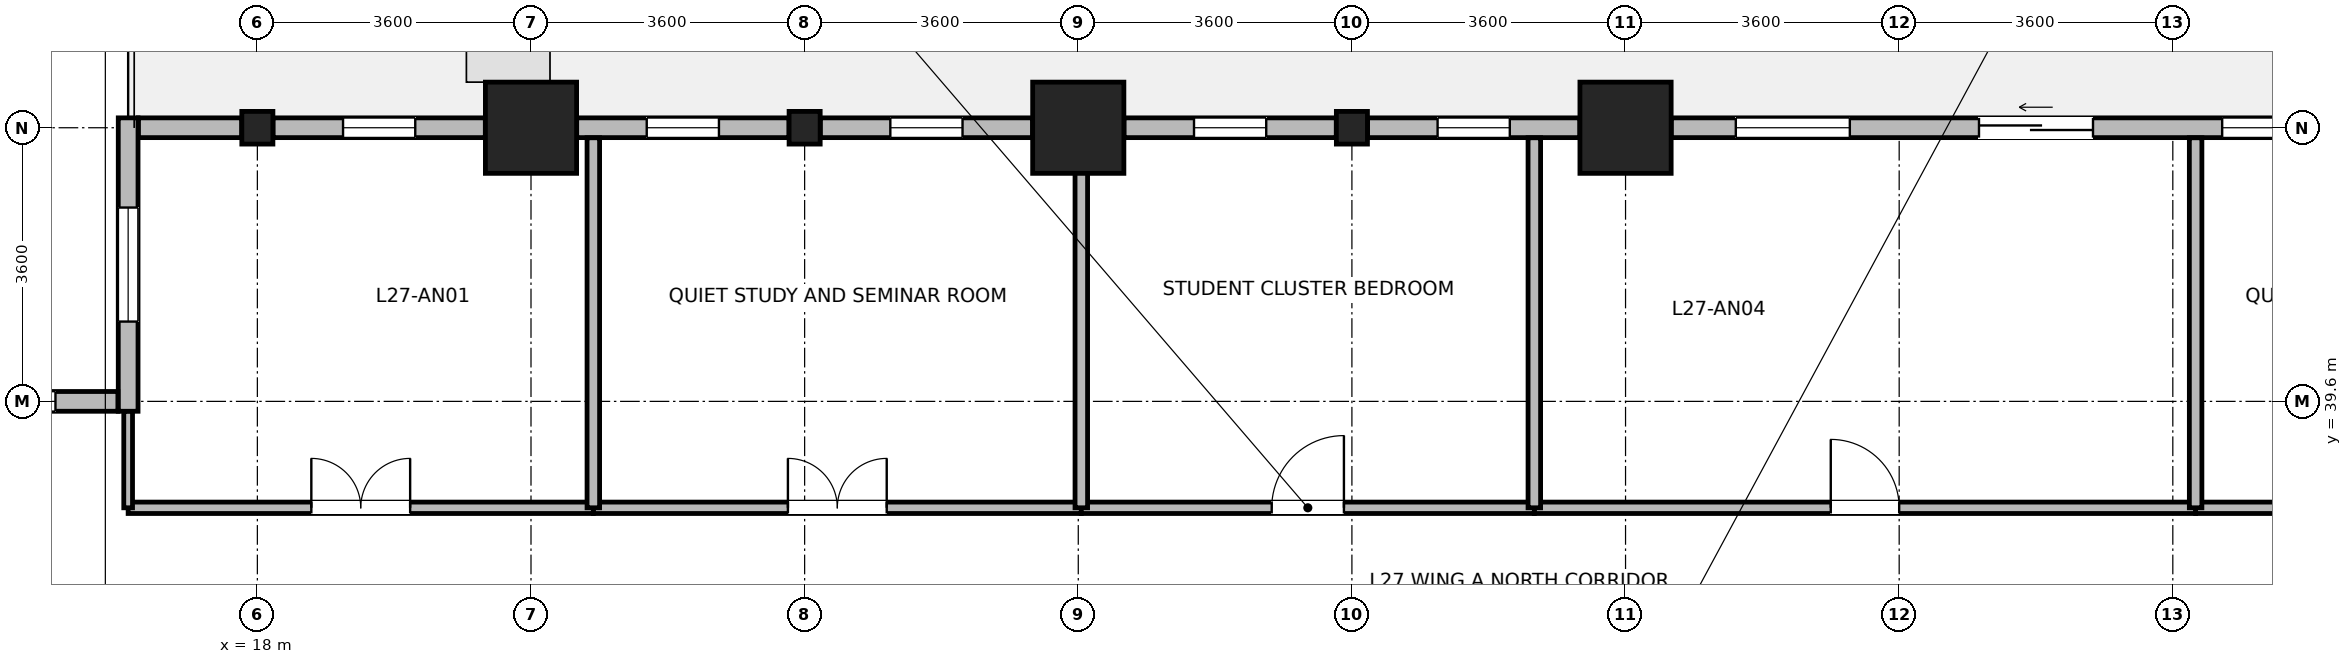
"""IFC4 building model, lengths in metres.
Left out: names, types, materials, properties, quantities, classifications, styles, units other than length and angle.
Written with IfcOpenShell. Run it as: python <this file> out.ifc"""

import sys

from ifc_helpers import new_model, si_unit, direction, frame, frame_2d, origin, origin_2d, place, context, subcontext, project, spatial, rectangle, i_section, extrude, source, transform, mapped, element, fill, save


model = new_model("IFC4")
c1 = context("Model", 3, precision=1e-05, world=origin(), true_north=direction((0.0, 1.0)))
c2 = subcontext(c1, "Body", "Model", "MODEL_VIEW")
j1 = project(units=[si_unit("LENGTHUNIT", "METRE"), si_unit("PLANEANGLEUNIT", "RADIAN")], contexts=[c1])
p1 = place(None, origin())
s1 = spatial("IfcSite", under=j1, at=p1, CompositionType="ELEMENT")
p2 = place(p1, origin())
s2 = spatial("IfcBuilding", under=s1, at=p2, CompositionType="ELEMENT")
p3 = place(p2, frame((0.0, 0.0, 108.2)))
s3 = spatial("IfcBuildingStorey", under=s2, at=p3, CompositionType="ELEMENT", Elevation=108.2)
m1 = source(origin(), c2, "Body", "SweptSolid", [
    extrude(rectangle(XDim=1.2, YDim=1.2, at=origin_2d()), origin(), (0.0, 0.0, 1.0), 3.7),
])
for number, where, z_axis, x_axis in (
    (1, (21.6, 43.2, 0.0), (0.0, 0.0, 1.0), (1.0, 0.0, 0.0)),
    (2, (28.8, 43.2, 0.0), (0.0, 0.0, 1.0), (1.0, 0.0, 0.0)),
    (3, (36.0, 43.2, 0.0), (0.0, 0.0, 1.0), (1.0, 0.0, 0.0)),
):
    element("IfcColumn", number, at=place(p3, frame(where, z_axis=z_axis, x_axis=x_axis)), inside=s3, PredefinedType="COLUMN", context=c2, shape_type="MappedRepresentation", body=[
        mapped(m1, transform((0.0, 0.0, 0.0), x_axis=(1.0, 0.0, 0.0), y_axis=(0.0, 1.0, 0.0), z_axis=(0.0, 0.0, 1.0), scale=1.0)),
    ])
m2 = source(origin(), c2, "Body", "SweptSolid", [
    extrude(i_section(OverallWidth=0.409, OverallDepth=0.43, WebThickness=0.024, FlangeThickness=0.033, FilletRadius=0.015, at=origin_2d()), origin(), (0.0, 0.0, 1.0), 3.7),
])
for number, where, z_axis, x_axis in (
    (4, (18.0, 43.2, 0.0), (0.0, 0.0, 1.0), (1.0, 0.0, 0.0)),
    (5, (25.2, 43.2, 0.0), (0.0, 0.0, 1.0), (1.0, 0.0, 0.0)),
    (6, (32.4, 43.2, 0.0), (0.0, 0.0, 1.0), (1.0, 0.0, 0.0)),
):
    element("IfcColumn", number, at=place(p3, frame(where, z_axis=z_axis, x_axis=x_axis)), inside=s3, PredefinedType="COLUMN", context=c2, shape_type="MappedRepresentation", body=[
        mapped(m2, transform((0.0, 0.0, 0.0), x_axis=(1.0, 0.0, 0.0), y_axis=(0.0, 1.0, 0.0), z_axis=(0.0, 0.0, 1.0), scale=1.0)),
    ])
p4 = place(p3, frame((36.601, 43.2, 0.0), z_axis=(0.0, 0.0, 1.0), x_axis=(1.0, 0.0, 0.0)))
e7 = element("IfcWall", 7, at=p4, inside=s3, PredefinedType="STANDARD", context=c2, shape_type="SweptSolid", body=[
    extrude(rectangle(XDim=9.598, YDim=0.26, at=frame_2d((4.799, 0.0))), origin(), (0.0, 0.0, 1.0), 2.98),
])
p5 = place(p4, frame((4.049, 0.0, 0.0)))
e8 = element("IfcOpeningElement", 8, at=p5, cuts=e7, PredefinedType="OPENING", context=c2, shape_type="SweptSolid", body=[
    extrude(rectangle(XDim=1.5, YDim=2.15, at=frame_2d((0.75, 1.075))), frame((0.0, 0.14, 0.0), z_axis=(0.0, -1.0, 0.0), x_axis=(1.0, 0.0, 0.0)), (0.0, 0.0, 1.0), 0.28),
])
p6 = place(p4, frame((0.85, 0.0, 0.85)))
e9 = element("IfcOpeningElement", 9, at=p6, cuts=e7, PredefinedType="OPENING", context=c2, shape_type="SweptSolid", body=[
    extrude(rectangle(XDim=1.5, YDim=1.85, at=frame_2d((0.75, 0.925))), frame((0.0, 0.14, 0.0), z_axis=(0.0, -1.0, 0.0), x_axis=(1.0, 0.0, 0.0)), (0.0, 0.0, 1.0), 0.28),
])
p7 = place(p4, frame((7.248, 0.0, 0.85)))
e10 = element("IfcOpeningElement", 10, at=p7, cuts=e7, PredefinedType="OPENING", context=c2, shape_type="SweptSolid", body=[
    extrude(rectangle(XDim=1.5, YDim=1.85, at=frame_2d((0.75, 0.925))), frame((0.0, 0.14, 0.0), z_axis=(0.0, -1.0, 0.0), x_axis=(1.0, 0.0, 0.0)), (0.0, 0.0, 1.0), 0.28),
])
p8 = place(p3, frame((32.605, 43.2, 0.0), z_axis=(0.0, 0.0, 1.0), x_axis=(1.0, 0.0, 0.0)))
e11 = element("IfcWall", 11, at=p8, inside=s3, PredefinedType="STANDARD", context=c2, shape_type="SweptSolid", body=[
    extrude(rectangle(XDim=2.793, YDim=0.26, at=frame_2d((1.397, 0.0))), origin(), (0.0, 0.0, 1.0), 2.98),
])
p9 = place(p8, frame((0.922, 0.0, 0.85)))
e12 = element("IfcOpeningElement", 12, at=p9, cuts=e11, PredefinedType="OPENING", context=c2, shape_type="SweptSolid", body=[
    extrude(rectangle(XDim=0.95, YDim=1.75, at=frame_2d((0.475, 0.875))), frame((0.0, 0.14, 0.0), z_axis=(0.0, -1.0, 0.0), x_axis=(1.0, 0.0, 0.0)), (0.0, 0.0, 1.0), 0.28),
])
p10 = place(p3, frame((29.401, 43.2, 0.0), z_axis=(0.0, 0.0, 1.0), x_axis=(1.0, 0.0, 0.0)))
e13 = element("IfcWall", 13, at=p10, inside=s3, PredefinedType="STANDARD", context=c2, shape_type="SweptSolid", body=[
    extrude(rectangle(XDim=2.794, YDim=0.26, at=frame_2d((1.397, 0.0))), origin(), (0.0, 0.0, 1.0), 2.98),
])
p11 = place(p10, frame((0.922, 0.0, 0.85)))
e14 = element("IfcOpeningElement", 14, at=p11, cuts=e13, PredefinedType="OPENING", context=c2, shape_type="SweptSolid", body=[
    extrude(rectangle(XDim=0.95, YDim=1.75, at=frame_2d((0.475, 0.875))), frame((0.0, 0.14, 0.0), z_axis=(0.0, -1.0, 0.0), x_axis=(1.0, 0.0, 0.0)), (0.0, 0.0, 1.0), 0.28),
])
p12 = place(p3, frame((25.406, 43.2, 0.0), z_axis=(0.0, 0.0, 1.0), x_axis=(1.0, 0.0, 0.0)))
e15 = element("IfcWall", 15, at=p12, inside=s3, PredefinedType="STANDARD", context=c2, shape_type="SweptSolid", body=[
    extrude(rectangle(XDim=2.793, YDim=0.26, at=frame_2d((1.397, 0.0))), origin(), (0.0, 0.0, 1.0), 2.98),
])
p13 = place(p12, frame((0.922, 0.0, 0.85)))
e16 = element("IfcOpeningElement", 16, at=p13, cuts=e15, PredefinedType="OPENING", context=c2, shape_type="SweptSolid", body=[
    extrude(rectangle(XDim=0.95, YDim=1.75, at=frame_2d((0.475, 0.875))), frame((0.0, 0.14, 0.0), z_axis=(0.0, -1.0, 0.0), x_axis=(1.0, 0.0, 0.0)), (0.0, 0.0, 1.0), 0.28),
])
p14 = place(p3, frame((22.201, 43.2, 0.0), z_axis=(0.0, 0.0, 1.0), x_axis=(1.0, 0.0, 0.0)))
e17 = element("IfcWall", 17, at=p14, inside=s3, PredefinedType="STANDARD", context=c2, shape_type="SweptSolid", body=[
    extrude(rectangle(XDim=2.793, YDim=0.26, at=frame_2d((1.397, 0.0))), origin(), (0.0, 0.0, 1.0), 2.98),
])
p15 = place(p14, frame((0.922, 0.0, 0.85)))
e18 = element("IfcOpeningElement", 18, at=p15, cuts=e17, PredefinedType="OPENING", context=c2, shape_type="SweptSolid", body=[
    extrude(rectangle(XDim=0.95, YDim=1.75, at=frame_2d((0.475, 0.875))), frame((0.0, 0.14, 0.0), z_axis=(0.0, -1.0, 0.0), x_axis=(1.0, 0.0, 0.0)), (0.0, 0.0, 1.0), 0.28),
])
p16 = place(p3, frame((18.206, 43.2, 0.0), z_axis=(0.0, 0.0, 1.0), x_axis=(1.0, 0.0, 0.0)))
e19 = element("IfcWall", 19, at=p16, inside=s3, PredefinedType="STANDARD", context=c2, shape_type="SweptSolid", body=[
    extrude(rectangle(XDim=2.793, YDim=0.26, at=frame_2d((1.397, 0.0))), origin(), (0.0, 0.0, 1.0), 2.98),
])
p17 = place(p16, frame((0.922, 0.0, 0.85)))
e20 = element("IfcOpeningElement", 20, at=p17, cuts=e19, PredefinedType="OPENING", context=c2, shape_type="SweptSolid", body=[
    extrude(rectangle(XDim=0.95, YDim=1.75, at=frame_2d((0.475, 0.875))), frame((0.0, 0.14, 0.0), z_axis=(0.0, -1.0, 0.0), x_axis=(1.0, 0.0, 0.0)), (0.0, 0.0, 1.0), 0.28),
])
p18 = place(p3, frame((16.435, 43.2, 0.0), z_axis=(0.0, 0.0, 1.0), x_axis=(1.0, 0.0, 0.0)))
e21 = element("IfcWall", 21, at=p18, inside=s3, PredefinedType="STANDARD", context=c2, shape_type="SweptSolid", body=[
    extrude(rectangle(XDim=1.359, YDim=0.26, at=frame_2d((0.68, 0.0))), origin(), (0.0, 0.0, 1.0), 2.98),
])
p19 = place(p3, frame((16.3, 39.47, 0.0), z_axis=(0.0, 0.0, 1.0), x_axis=(0.0, 1.0, 0.0)))
e22 = element("IfcWall", 22, at=p19, inside=s3, PredefinedType="STANDARD", context=c2, shape_type="SweptSolid", body=[
    extrude(rectangle(XDim=3.86, YDim=0.26, at=frame_2d((1.93, 0.0))), origin(), (0.0, 0.0, 1.0), 3.43),
])
p20 = place(p19, frame((1.18, 0.0, 0.85)))
e23 = element("IfcOpeningElement", 23, at=p20, cuts=e22, PredefinedType="OPENING", context=c2, shape_type="SweptSolid", body=[
    extrude(rectangle(XDim=1.5, YDim=1.85, at=frame_2d((0.75, 0.925))), frame((0.0, 0.14, 0.0), z_axis=(0.0, -1.0, 0.0), x_axis=(1.0, 0.0, 0.0)), (0.0, 0.0, 1.0), 0.28),
])
p21 = place(p3, frame((6.737, 39.6, 0.0), z_axis=(0.0, 0.0, 1.0), x_axis=(1.0, 0.0, 0.0)))
e24 = element("IfcWall", 24, at=p21, inside=s3, PredefinedType="STANDARD", context=c2, shape_type="SweptSolid", body=[
    extrude(rectangle(XDim=9.428, YDim=0.26, at=frame_2d((4.714, 0.0))), origin(), (0.0, 0.0, 1.0), 3.43),
])
p22 = place(p21, frame((0.821, 0.0, 0.85)))
e25 = element("IfcOpeningElement", 25, at=p22, cuts=e24, PredefinedType="OPENING", context=c2, shape_type="SweptSolid", body=[
    extrude(rectangle(XDim=1.5, YDim=1.85, at=frame_2d((0.75, 0.925))), frame((0.0, 0.14, 0.0), z_axis=(0.0, -1.0, 0.0), x_axis=(1.0, 0.0, 0.0)), (0.0, 0.0, 1.0), 0.28),
])
p23 = place(p21, frame((3.964, 0.0, 0.85)))
e26 = element("IfcOpeningElement", 26, at=p23, cuts=e24, PredefinedType="OPENING", context=c2, shape_type="SweptSolid", body=[
    extrude(rectangle(XDim=1.5, YDim=1.85, at=frame_2d((0.75, 0.925))), frame((0.0, 0.14, 0.0), z_axis=(0.0, -1.0, 0.0), x_axis=(1.0, 0.0, 0.0)), (0.0, 0.0, 1.0), 0.28),
])
p24 = place(p21, frame((7.107, 0.0, 0.85)))
e27 = element("IfcOpeningElement", 27, at=p24, cuts=e24, PredefinedType="OPENING", context=c2, shape_type="SweptSolid", body=[
    extrude(rectangle(XDim=1.5, YDim=1.85, at=frame_2d((0.75, 0.925))), frame((0.0, 0.14, 0.0), z_axis=(0.0, -1.0, 0.0), x_axis=(1.0, 0.0, 0.0)), (0.0, 0.0, 1.0), 0.28),
])
p25 = place(p3, frame((34.8, 38.2, 0.0), z_axis=(0.0, 0.0, 1.0), x_axis=(1.0, 0.0, 0.0)))
e28 = element("IfcWall", 28, at=p25, inside=s3, PredefinedType="PARTITIONING", context=c2, shape_type="SweptSolid", body=[
    extrude(rectangle(XDim=8.7, YDim=0.15, at=frame_2d((4.35, 0.0))), origin(), (0.0, 0.0, 1.0), 3.43),
])
p26 = place(p25, frame((3.9, 0.0, 0.0)))
e29 = element("IfcOpeningElement", 29, at=p26, cuts=e28, PredefinedType="OPENING", context=c2, shape_type="SweptSolid", body=[
    extrude(rectangle(XDim=0.9, YDim=2.08, at=frame_2d((0.45, 1.04))), frame((0.0, 0.085, 0.0), z_axis=(0.0, -1.0, 0.0), x_axis=(1.0, 0.0, 0.0)), (0.0, 0.0, 1.0), 0.17),
])
p27 = place(p3, frame((22.42, 38.2, 0.0), z_axis=(0.0, 0.0, 1.0), x_axis=(1.0, 0.0, 0.0)))
e30 = element("IfcWall", 30, at=p27, inside=s3, PredefinedType="PARTITIONING", context=c2, shape_type="SweptSolid", body=[
    extrude(rectangle(XDim=6.42, YDim=0.15, at=frame_2d((3.21, 0.0))), origin(), (0.0, 0.0, 1.0), 3.43),
])
p28 = place(p27, frame((2.56, 0.0, 0.0)))
e31 = element("IfcOpeningElement", 31, at=p28, cuts=e30, PredefinedType="OPENING", context=c2, shape_type="SweptSolid", body=[
    extrude(rectangle(XDim=1.3, YDim=2.12, at=frame_2d((0.65, 1.06))), frame((0.0, 0.085, 0.0), z_axis=(0.0, -1.0, 0.0), x_axis=(1.0, 0.0, 0.0)), (0.0, 0.0, 1.0), 0.17),
])
p29 = place(p3, frame((16.3, 38.2, 0.0), z_axis=(0.0, 0.0, 1.0), x_axis=(1.0, 0.0, 0.0)))
e32 = element("IfcWall", 32, at=p29, inside=s3, PredefinedType="PARTITIONING", context=c2, shape_type="SweptSolid", body=[
    extrude(rectangle(XDim=6.12, YDim=0.15, at=frame_2d((3.06, 0.0))), origin(), (0.0, 0.0, 1.0), 3.43),
])
p30 = place(p29, frame((2.41, 0.0, 0.0)))
e33 = element("IfcOpeningElement", 33, at=p30, cuts=e32, PredefinedType="OPENING", context=c2, shape_type="SweptSolid", body=[
    extrude(rectangle(XDim=1.3, YDim=2.12, at=frame_2d((0.65, 1.06))), frame((0.0, 0.085, 0.0), z_axis=(0.0, -1.0, 0.0), x_axis=(1.0, 0.0, 0.0)), (0.0, 0.0, 1.0), 0.17),
])
p31 = place(p3, frame((28.84, 38.2, 0.0), z_axis=(0.0, 0.0, 1.0), x_axis=(1.0, 0.0, 0.0)))
e34 = element("IfcWall", 34, at=p31, inside=s3, PredefinedType="PARTITIONING", context=c2, shape_type="SweptSolid", body=[
    extrude(rectangle(XDim=5.96, YDim=0.15, at=frame_2d((2.98, 0.0))), origin(), (0.0, 0.0, 1.0), 3.43),
])
p32 = place(p31, frame((2.505, 0.0, 0.0)))
e35 = element("IfcOpeningElement", 35, at=p32, cuts=e34, PredefinedType="OPENING", context=c2, shape_type="SweptSolid", body=[
    extrude(rectangle(XDim=0.95, YDim=2.1, at=frame_2d((0.475, 1.05))), frame((0.0, 0.085, 0.0), z_axis=(0.0, -1.0, 0.0), x_axis=(1.0, 0.0, 0.0)), (0.0, 0.0, 1.0), 0.17),
])
p33 = place(p3, frame((43.5, 38.2, 0.0), z_axis=(0.0, 0.0, 1.0), x_axis=(1.0, 0.0, 0.0)))
e36 = element("IfcWall", 36, at=p33, inside=s3, PredefinedType="PARTITIONING", context=c2, shape_type="SweptSolid", body=[
    extrude(rectangle(XDim=5.74, YDim=0.15, at=frame_2d((2.87, 0.0))), origin(), (0.0, 0.0, 1.0), 3.43),
])
p34 = place(p33, frame((2.22, 0.0, 0.0)))
e37 = element("IfcOpeningElement", 37, at=p34, cuts=e36, PredefinedType="OPENING", context=c2, shape_type="SweptSolid", body=[
    extrude(rectangle(XDim=1.3, YDim=2.12, at=frame_2d((0.65, 1.06))), frame((0.0, 0.085, 0.0), z_axis=(0.0, -1.0, 0.0), x_axis=(1.0, 0.0, 0.0)), (0.0, 0.0, 1.0), 0.17),
])
p35 = place(p3, frame((16.3, 38.2, 0.0), z_axis=(0.0, 0.0, 1.0), x_axis=(0.0, 1.0, 0.0)))
e38 = element("IfcWall", 38, at=p35, inside=s3, PredefinedType="PARTITIONING", context=c2, shape_type="SweptSolid", body=[
    extrude(rectangle(XDim=1.268, YDim=0.115, at=frame_2d((0.634, 0.0))), origin(), (0.0, 0.0, 1.0), 3.43),
])
p36 = place(p3, frame((22.42, 38.2, 0.0), z_axis=(0.0, 0.0, 1.0), x_axis=(0.0, 1.0, 0.0)))
e39 = element("IfcWall", 39, at=p36, inside=s3, PredefinedType="PARTITIONING", context=c2, shape_type="SweptSolid", body=[
    extrude(rectangle(XDim=4.868, YDim=0.165, at=frame_2d((2.434, 0.0))), origin(), (0.0, 0.0, 1.0), 3.43),
])
p37 = place(p3, frame((28.84, 38.2, 0.0), z_axis=(0.0, 0.0, 1.0), x_axis=(0.0, 1.0, 0.0)))
e40 = element("IfcWall", 40, at=p37, inside=s3, PredefinedType="PARTITIONING", context=c2, shape_type="SweptSolid", body=[
    extrude(rectangle(XDim=4.868, YDim=0.165, at=frame_2d((2.434, 0.0))), origin(), (0.0, 0.0, 1.0), 2.93),
])
for number, where, z_axis, x_axis in (
    (41, (34.8, 38.2, 0.0), (0.0, 0.0, 1.0), (0.0, 1.0, 0.0)),
    (42, (43.5, 38.2, 0.0), (0.0, 0.0, 1.0), (0.0, 1.0, 0.0)),
):
    element("IfcWall", number, at=place(p3, frame(where, z_axis=z_axis, x_axis=x_axis)), inside=s3, PredefinedType="PARTITIONING", context=c2, shape_type="SweptSolid", body=[
        extrude(rectangle(XDim=4.868, YDim=0.165, at=frame_2d((2.434, 0.0))), origin(), (0.0, 0.0, 1.0), 3.43),
    ])
p38 = place(p5, origin())
e43 = element("IfcDoor", 43, at=p38, inside=s3, OperationType="SLIDING_TO_LEFT", PredefinedType="DOOR", context=c2, shape_type="SweptSolid", body=[
    extrude(rectangle(XDim=1.5, YDim=2.15, at=frame_2d((0.75, 1.075))), frame((0.0, 0.025, 0.0), z_axis=(0.0, -1.0, 0.0), x_axis=(1.0, 0.0, 0.0)), (0.0, 0.0, 1.0), 0.05),
])
fill(e8, e43)
p39 = place(p6, origin())
e44 = element("IfcWindow", 44, at=p39, inside=s3, PartitioningType="SINGLE_PANEL", PredefinedType="WINDOW", context=c2, shape_type="SweptSolid", body=[
    extrude(rectangle(XDim=1.5, YDim=1.85, at=frame_2d((0.75, 0.925))), frame((0.0, 0.03, 0.0), z_axis=(0.0, -1.0, 0.0), x_axis=(1.0, 0.0, 0.0)), (0.0, 0.0, 1.0), 0.06),
])
fill(e9, e44)
p40 = place(p7, origin())
e45 = element("IfcWindow", 45, at=p40, inside=s3, PartitioningType="SINGLE_PANEL", PredefinedType="WINDOW", context=c2, shape_type="SweptSolid", body=[
    extrude(rectangle(XDim=1.5, YDim=1.85, at=frame_2d((0.75, 0.925))), frame((0.0, 0.03, 0.0), z_axis=(0.0, -1.0, 0.0), x_axis=(1.0, 0.0, 0.0)), (0.0, 0.0, 1.0), 0.06),
])
fill(e10, e45)
p41 = place(p9, origin())
e46 = element("IfcWindow", 46, at=p41, inside=s3, PartitioningType="SINGLE_PANEL", PredefinedType="WINDOW", context=c2, shape_type="SweptSolid", body=[
    extrude(rectangle(XDim=0.95, YDim=1.75, at=frame_2d((0.475, 0.875))), frame((0.0, 0.03, 0.0), z_axis=(0.0, -1.0, 0.0), x_axis=(1.0, 0.0, 0.0)), (0.0, 0.0, 1.0), 0.06),
])
fill(e12, e46)
p42 = place(p11, origin())
e47 = element("IfcWindow", 47, at=p42, inside=s3, PartitioningType="SINGLE_PANEL", PredefinedType="WINDOW", context=c2, shape_type="SweptSolid", body=[
    extrude(rectangle(XDim=0.95, YDim=1.75, at=frame_2d((0.475, 0.875))), frame((0.0, 0.03, 0.0), z_axis=(0.0, -1.0, 0.0), x_axis=(1.0, 0.0, 0.0)), (0.0, 0.0, 1.0), 0.06),
])
fill(e14, e47)
p43 = place(p13, origin())
e48 = element("IfcWindow", 48, at=p43, inside=s3, PartitioningType="SINGLE_PANEL", PredefinedType="WINDOW", context=c2, shape_type="SweptSolid", body=[
    extrude(rectangle(XDim=0.95, YDim=1.75, at=frame_2d((0.475, 0.875))), frame((0.0, 0.03, 0.0), z_axis=(0.0, -1.0, 0.0), x_axis=(1.0, 0.0, 0.0)), (0.0, 0.0, 1.0), 0.06),
])
fill(e16, e48)
p44 = place(p15, origin())
e49 = element("IfcWindow", 49, at=p44, inside=s3, PartitioningType="SINGLE_PANEL", PredefinedType="WINDOW", context=c2, shape_type="SweptSolid", body=[
    extrude(rectangle(XDim=0.95, YDim=1.75, at=frame_2d((0.475, 0.875))), frame((0.0, 0.03, 0.0), z_axis=(0.0, -1.0, 0.0), x_axis=(1.0, 0.0, 0.0)), (0.0, 0.0, 1.0), 0.06),
])
fill(e18, e49)
p45 = place(p17, origin())
e50 = element("IfcWindow", 50, at=p45, inside=s3, PartitioningType="SINGLE_PANEL", PredefinedType="WINDOW", context=c2, shape_type="SweptSolid", body=[
    extrude(rectangle(XDim=0.95, YDim=1.75, at=frame_2d((0.475, 0.875))), frame((0.0, 0.03, 0.0), z_axis=(0.0, -1.0, 0.0), x_axis=(1.0, 0.0, 0.0)), (0.0, 0.0, 1.0), 0.06),
])
fill(e20, e50)
p46 = place(p20, origin())
e51 = element("IfcWindow", 51, at=p46, inside=s3, PartitioningType="SINGLE_PANEL", PredefinedType="WINDOW", context=c2, shape_type="SweptSolid", body=[
    extrude(rectangle(XDim=1.5, YDim=1.85, at=frame_2d((0.75, 0.925))), frame((0.0, 0.03, 0.0), z_axis=(0.0, -1.0, 0.0), x_axis=(1.0, 0.0, 0.0)), (0.0, 0.0, 1.0), 0.06),
])
fill(e23, e51)
p47 = place(p24, origin())
e52 = element("IfcWindow", 52, at=p47, inside=s3, PartitioningType="SINGLE_PANEL", PredefinedType="WINDOW", context=c2, shape_type="SweptSolid", body=[
    extrude(rectangle(XDim=1.5, YDim=1.85, at=frame_2d((0.75, 0.925))), frame((0.0, 0.03, 0.0), z_axis=(0.0, -1.0, 0.0), x_axis=(1.0, 0.0, 0.0)), (0.0, 0.0, 1.0), 0.06),
])
fill(e27, e52)
p48 = place(p26, origin())
e53 = element("IfcDoor", 53, at=p48, inside=s3, OperationType="SINGLE_SWING_LEFT", PredefinedType="DOOR", context=c2, shape_type="SweptSolid", body=[
    extrude(rectangle(XDim=0.9, YDim=2.08, at=frame_2d((0.45, 1.04))), frame((0.0, 0.025, 0.0), z_axis=(0.0, -1.0, 0.0), x_axis=(1.0, 0.0, 0.0)), (0.0, 0.0, 1.0), 0.05),
])
fill(e29, e53)
p49 = place(p28, origin())
e54 = element("IfcDoor", 54, at=p49, inside=s3, OperationType="DOUBLE_DOOR_SINGLE_SWING", PredefinedType="DOOR", context=c2, shape_type="SweptSolid", body=[
    extrude(rectangle(XDim=1.3, YDim=2.12, at=frame_2d((0.65, 1.06))), frame((0.0, 0.025, 0.0), z_axis=(0.0, -1.0, 0.0), x_axis=(1.0, 0.0, 0.0)), (0.0, 0.0, 1.0), 0.05),
])
fill(e31, e54)
p50 = place(p30, origin())
e55 = element("IfcDoor", 55, at=p50, inside=s3, OperationType="DOUBLE_DOOR_SINGLE_SWING", PredefinedType="DOOR", context=c2, shape_type="SweptSolid", body=[
    extrude(rectangle(XDim=1.3, YDim=2.12, at=frame_2d((0.65, 1.06))), frame((0.0, 0.025, 0.0), z_axis=(0.0, -1.0, 0.0), x_axis=(1.0, 0.0, 0.0)), (0.0, 0.0, 1.0), 0.05),
])
fill(e33, e55)
p51 = place(p32, origin())
e56 = element("IfcDoor", 56, at=p51, inside=s3, OperationType="SINGLE_SWING_RIGHT", PredefinedType="DOOR", context=c2, shape_type="SweptSolid", body=[
    extrude(rectangle(XDim=0.95, YDim=2.1, at=frame_2d((0.475, 1.05))), frame((0.0, 0.025, 0.0), z_axis=(0.0, -1.0, 0.0), x_axis=(1.0, 0.0, 0.0)), (0.0, 0.0, 1.0), 0.05),
])
fill(e35, e56)
save(model, sys.argv[1])
